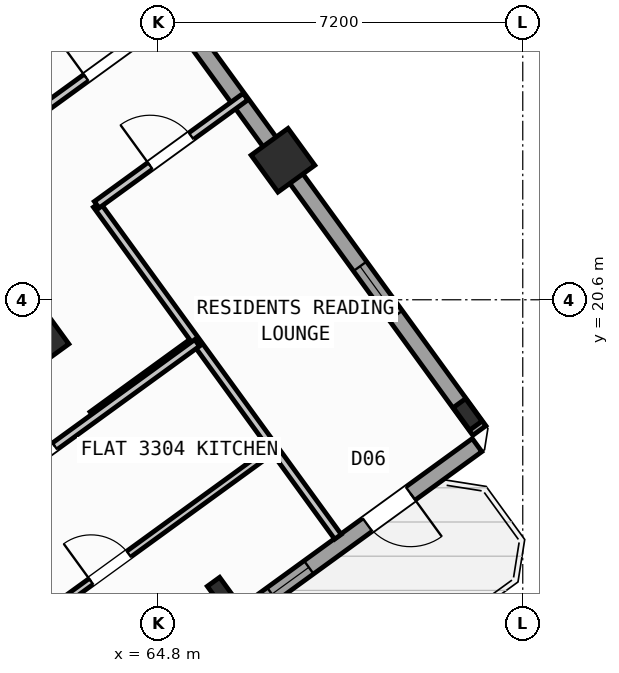
"""IFC4 building model, lengths in metres.
Left out: names, types, materials, properties, quantities, classifications, styles, units other than length and angle.
Written with IfcOpenShell. Run it as: python <this file> out.ifc"""

import sys

from ifc_helpers import new_model, si_unit, direction, frame, frame_2d, origin, origin_2d, place, context, subcontext, project, spatial, rectangle, hollow_rectangle, i_section, extrude, source, transform, mapped, element, fill, save


model = new_model("IFC4")
c1 = context("Model", 3, precision=1e-05, world=origin(), true_north=direction((0.0, 1.0)))
c2 = subcontext(c1, "Body", "Model", "MODEL_VIEW")
j1 = project(units=[si_unit("LENGTHUNIT", "METRE"), si_unit("PLANEANGLEUNIT", "RADIAN")], contexts=[c1])
p1 = place(None, origin())
s1 = spatial("IfcSite", under=j1, at=p1, CompositionType="ELEMENT")
p2 = place(p1, origin())
s2 = spatial("IfcBuilding", under=s1, at=p2, CompositionType="ELEMENT")
p3 = place(p2, frame((0.0, 0.0, 132.6)))
s3 = spatial("IfcBuildingStorey", under=s2, at=p3, CompositionType="ELEMENT", Elevation=132.6)
m1 = source(origin(), c2, "Body", "SweptSolid", [
    extrude(i_section(OverallWidth=0.3, OverallDepth=0.55, WebThickness=0.015, FlangeThickness=0.029, at=origin_2d()), origin(), (0.0, 0.0, 1.0), 3.6),
])
p4 = place(p3, frame((66.058, 14.811, 0.0), z_axis=(0.0, 0.0, 1.0), x_axis=(0.809016994375, 0.587785252292, 0.0)))
e1 = element("IfcColumn", 1, at=p4, inside=s3, PredefinedType="COLUMN", context=c2, shape_type="MappedRepresentation", body=[
    mapped(m1, transform((0.0, 0.0, 0.0), scale=1.0)),
])
m2 = source(origin(), c2, "Body", "SweptSolid", [
    extrude(hollow_rectangle(XDim=0.9, YDim=0.9, WallThickness=0.036, at=origin_2d()), origin(), (0.0, 0.0, 1.0), 3.6),
])
p5 = place(p3, frame((62.414, 19.827, 0.0), z_axis=(0.0, 0.0, 1.0), x_axis=(0.809016994375, 0.587785252292, 0.0)))
e2 = element("IfcColumn", 2, at=p5, inside=s3, PredefinedType="COLUMN", context=c2, shape_type="MappedRepresentation", body=[
    mapped(m2, transform((0.0, 0.0, 0.0), scale=1.0)),
])
p6 = place(p3, frame((70.912, 18.338, 0.0), z_axis=(0.0, 0.0, 1.0), x_axis=(0.809016994375, 0.587785252292, 0.0)))
e3 = element("IfcColumn", 3, at=p6, inside=s3, PredefinedType="COLUMN", context=c2, shape_type="MappedRepresentation", body=[
    mapped(m1, transform((0.0, 0.0, 0.0), scale=1.0)),
])
p7 = place(p3, frame((67.268, 23.354, 0.0), z_axis=(0.0, 0.0, 1.0), x_axis=(0.809016994375, 0.587785252292, 0.0)))
e4 = element("IfcColumn", 4, at=p7, inside=s3, PredefinedType="COLUMN", context=c2, shape_type="MappedRepresentation", body=[
    mapped(m2, transform((0.0, 0.0, 0.0), scale=1.0)),
])
p8 = place(p3, frame((58.455, 35.484, 0.0), z_axis=(0.0, 0.0, 1.0), x_axis=(0.587783625747, -0.809018176127, 0.0)))
e5 = element("IfcWall", 5, at=p8, inside=s3, PredefinedType="STANDARD", context=c2, shape_type="SweptSolid", body=[
    extrude(rectangle(XDim=21.587, YDim=0.32, at=frame_2d((10.794, 0.0))), origin(), (0.0, 0.0, 1.0), 2.745),
])
p9 = place(p8, frame((1.475, 0.0, 0.8)))
e6 = element("IfcOpeningElement", 6, at=p9, cuts=e5, PredefinedType="OPENING", context=c2, shape_type="SweptSolid", body=[
    extrude(rectangle(XDim=2.1, YDim=1.55, at=frame_2d((1.05, 0.775))), frame((0.0, 0.17, 0.0), z_axis=(0.0, -1.0, 0.0), x_axis=(1.0, 0.0, 0.0)), (0.0, 0.0, 1.0), 0.34),
])
p10 = place(p8, frame((5.13, 0.0, 0.85)))
e7 = element("IfcOpeningElement", 7, at=p10, cuts=e5, PredefinedType="OPENING", context=c2, shape_type="SweptSolid", body=[
    extrude(rectangle(XDim=1.5, YDim=1.5, at=frame_2d((0.75, 0.75))), frame((0.0, 0.17, 0.0), z_axis=(0.0, -1.0, 0.0), x_axis=(1.0, 0.0, 0.0)), (0.0, 0.0, 1.0), 0.34),
])
p11 = place(p8, frame((8.929, 0.0, 0.85)))
e8 = element("IfcOpeningElement", 8, at=p11, cuts=e5, PredefinedType="OPENING", context=c2, shape_type="SweptSolid", body=[
    extrude(rectangle(XDim=1.5, YDim=1.5, at=frame_2d((0.75, 0.75))), frame((0.0, 0.17, 0.0), z_axis=(0.0, -1.0, 0.0), x_axis=(1.0, 0.0, 0.0)), (0.0, 0.0, 1.0), 0.34),
])
p12 = place(p8, frame((17.581, 0.0, 0.95)))
e9 = element("IfcOpeningElement", 9, at=p12, cuts=e5, PredefinedType="OPENING", context=c2, shape_type="SweptSolid", body=[
    extrude(rectangle(XDim=1.2, YDim=1.4, at=frame_2d((0.6, 0.7))), frame((0.0, 0.17, 0.0), z_axis=(0.0, -1.0, 0.0), x_axis=(1.0, 0.0, 0.0)), (0.0, 0.0, 1.0), 0.34),
])
p13 = place(p3, frame((71.098, 17.731, 0.0), z_axis=(0.0, 0.0, 1.0), x_axis=(-0.809021120468, -0.587779573171, 0.0)))
e10 = element("IfcWall", 10, at=p13, inside=s3, PredefinedType="STANDARD", context=c2, shape_type="SweptSolid", body=[
    extrude(rectangle(XDim=17.588, YDim=0.32, at=frame_2d((8.794, 0.0))), origin(), (0.0, 0.0, 1.0), 3.32),
])
p14 = place(p13, frame((1.624, 0.0, 0.0)))
e11 = element("IfcOpeningElement", 11, at=p14, cuts=e10, PredefinedType="OPENING", context=c2, shape_type="SweptSolid", body=[
    extrude(rectangle(XDim=1.05, YDim=2.15, at=frame_2d((0.525, 1.075))), frame((0.0, 0.17, 0.0), z_axis=(0.0, -1.0, 0.0), x_axis=(1.0, 0.0, 0.0)), (0.0, 0.0, 1.0), 0.34),
])
p15 = place(p13, frame((4.104, 0.0, 1.0)))
e12 = element("IfcOpeningElement", 12, at=p15, cuts=e10, PredefinedType="OPENING", context=c2, shape_type="SweptSolid", body=[
    extrude(rectangle(XDim=0.9, YDim=1.25, at=frame_2d((0.45, 0.625))), frame((0.0, 0.17, 0.0), z_axis=(0.0, -1.0, 0.0), x_axis=(1.0, 0.0, 0.0)), (0.0, 0.0, 1.0), 0.34),
])
p16 = place(p13, frame((7.879, 0.0, 0.85)))
e13 = element("IfcOpeningElement", 13, at=p16, cuts=e10, PredefinedType="OPENING", context=c2, shape_type="SweptSolid", body=[
    extrude(rectangle(XDim=1.8, YDim=1.5, at=frame_2d((0.9, 0.75))), frame((0.0, 0.17, 0.0), z_axis=(0.0, -1.0, 0.0), x_axis=(1.0, 0.0, 0.0)), (0.0, 0.0, 1.0), 0.34),
])
p17 = place(p13, frame((12.849, 0.0, 0.85)))
e14 = element("IfcOpeningElement", 14, at=p17, cuts=e10, PredefinedType="OPENING", context=c2, shape_type="SweptSolid", body=[
    extrude(rectangle(XDim=1.8, YDim=1.5, at=frame_2d((0.9, 0.75))), frame((0.0, 0.17, 0.0), z_axis=(0.0, -1.0, 0.0), x_axis=(1.0, 0.0, 0.0)), (0.0, 0.0, 1.0), 0.34),
])
p18 = place(p3, frame((63.507, 18.322, 0.0), z_axis=(0.0, 0.0, 1.0), x_axis=(0.809034604122, 0.587761013791, 0.0)))
e15 = element("IfcWall", 15, at=p18, inside=s3, PredefinedType="PARTITIONING", context=c2, shape_type="SweptSolid", body=[
    extrude(rectangle(XDim=2.51, YDim=0.16, at=frame_2d((1.255, 0.0))), origin(), (0.0, 0.0, 1.0), 3.31),
])
p19 = place(p3, frame((68.353, 15.922, 0.0), z_axis=(0.0, 0.0, 1.0), x_axis=(-0.58776839458, 0.809029241952, 0.0)))
e16 = element("IfcWall", 16, at=p19, inside=s3, PredefinedType="PARTITIONING", context=c2, shape_type="SweptSolid", body=[
    extrude(rectangle(XDim=8.1, YDim=0.16, at=frame_2d((4.05, 0.0))), origin(), (0.0, 0.0, 1.0), 3.31),
])
p20 = place(p3, frame((63.592, 22.475, 0.0), z_axis=(0.0, 0.0, 1.0), x_axis=(0.809035546126, 0.58775971715, 0.0)))
e17 = element("IfcWall", 17, at=p20, inside=s3, PredefinedType="PARTITIONING", context=c2, shape_type="SweptSolid", body=[
    extrude(rectangle(XDim=3.63, YDim=0.16, at=frame_2d((1.815, 0.0))), origin(), (0.0, 0.0, 1.0), 3.31),
])
p21 = place(p20, frame((1.305, 0.0, 0.0)))
e18 = element("IfcOpeningElement", 18, at=p21, cuts=e17, PredefinedType="OPENING", context=c2, shape_type="SweptSolid", body=[
    extrude(rectangle(XDim=1.0, YDim=2.1, at=frame_2d((0.5, 1.05))), frame((0.0, 0.09, 0.0), z_axis=(0.0, -1.0, 0.0), x_axis=(1.0, 0.0, 0.0)), (0.0, 0.0, 1.0), 0.18),
])
p22 = place(p3, frame((62.328, 24.215, 0.0), z_axis=(0.0, 0.0, 1.0), x_axis=(0.809003564202, 0.587803736896, 0.0)))
e19 = element("IfcWall", 19, at=p22, inside=s3, PredefinedType="PARTITIONING", context=c2, shape_type="SweptSolid", body=[
    extrude(rectangle(XDim=3.63, YDim=0.16, at=frame_2d((1.815, 0.0))), origin(), (0.0, 0.0, 1.0), 3.31),
])
p23 = place(p22, frame((1.305, 0.0, 0.0)))
e20 = element("IfcOpeningElement", 20, at=p23, cuts=e19, PredefinedType="OPENING", context=c2, shape_type="SweptSolid", body=[
    extrude(rectangle(XDim=1.0, YDim=2.1, at=frame_2d((0.5, 1.05))), frame((0.0, 0.09, 0.0), z_axis=(0.0, -1.0, 0.0), x_axis=(1.0, 0.0, 0.0)), (0.0, 0.0, 1.0), 0.18),
])
p24 = place(p3, frame((53.705, 11.126, 0.0), z_axis=(0.0, 0.0, 1.0), x_axis=(0.809014504436, 0.587788679384, 0.0)))
e21 = element("IfcWall", 21, at=p24, inside=s3, PredefinedType="PARTITIONING", context=c2, shape_type="SweptSolid", body=[
    extrude(rectangle(XDim=14.67, YDim=0.16, at=frame_2d((7.335, 0.0))), origin(), (0.0, 0.0, 1.0), 3.31),
])
p25 = place(p24, frame((10.2, 0.0, 0.0)))
e22 = element("IfcOpeningElement", 22, at=p25, cuts=e21, PredefinedType="OPENING", context=c2, shape_type="SweptSolid", body=[
    extrude(rectangle(XDim=1.0, YDim=2.1, at=frame_2d((0.5, 1.05))), frame((0.0, 0.09, 0.0), z_axis=(0.0, -1.0, 0.0), x_axis=(1.0, 0.0, 0.0)), (0.0, 0.0, 1.0), 0.18),
])
p26 = place(p3, frame((56.249, 9.785, 0.0), z_axis=(0.0, 0.0, 1.0), x_axis=(0.809011747655, 0.587792473715, 0.0)))
e23 = element("IfcWall", 23, at=p26, inside=s3, PredefinedType="PLUMBINGWALL", context=c2, shape_type="SweptSolid", body=[
    extrude(rectangle(XDim=13.4, YDim=0.14, at=frame_2d((6.7, 0.0))), origin(), (0.0, 0.0, 1.0), 3.31),
])
p27 = place(p26, frame((8.94, 0.0, 0.0)))
e24 = element("IfcOpeningElement", 24, at=p27, cuts=e23, PredefinedType="OPENING", context=c2, shape_type="SweptSolid", body=[
    extrude(rectangle(XDim=0.92, YDim=2.08, at=frame_2d((0.46, 1.04))), frame((0.0, 0.08, 0.0), z_axis=(0.0, -1.0, 0.0), x_axis=(1.0, 0.0, 0.0)), (0.0, 0.0, 1.0), 0.16),
])
m3 = source(origin(), c2, "Body", "SweptSolid", [
    extrude(rectangle(XDim=1.05, YDim=2.15, at=frame_2d((0.525, 1.075))), frame((0.0, 0.025, 0.0), z_axis=(0.0, -1.0, 0.0), x_axis=(1.0, 0.0, 0.0)), (0.0, 0.0, 1.0), 0.05),
])
p28 = place(p14, origin())
e25 = element("IfcDoor", 25, at=p28, inside=s3, OperationType="SINGLE_SWING_LEFT", PredefinedType="DOOR", context=c2, shape_type="MappedRepresentation", body=[
    mapped(m3, transform((0.0, 0.0, 0.0), scale=1.0)),
])
fill(e11, e25)
m4 = source(origin(), c2, "Body", "SweptSolid", [
    extrude(rectangle(XDim=1.2, YDim=1.4, at=frame_2d((0.6, 0.7))), frame((0.0, 0.03, 0.0), z_axis=(0.0, -1.0, 0.0), x_axis=(1.0, 0.0, 0.0)), (0.0, 0.0, 1.0), 0.06),
])
p29 = place(p12, origin())
e26 = element("IfcWindow", 26, at=p29, inside=s3, PartitioningType="SINGLE_PANEL", PredefinedType="WINDOW", context=c2, shape_type="MappedRepresentation", body=[
    mapped(m4, transform((0.0, 0.0, 0.0), scale=1.0)),
])
fill(e9, e26)
m5 = source(origin(), c2, "Body", "SweptSolid", [
    extrude(rectangle(XDim=0.9, YDim=1.25, at=frame_2d((0.45, 0.625))), frame((0.0, 0.03, 0.0), z_axis=(0.0, -1.0, 0.0), x_axis=(1.0, 0.0, 0.0)), (0.0, 0.0, 1.0), 0.06),
])
p30 = place(p15, origin())
e27 = element("IfcWindow", 27, at=p30, inside=s3, PartitioningType="SINGLE_PANEL", PredefinedType="WINDOW", context=c2, shape_type="MappedRepresentation", body=[
    mapped(m5, transform((0.0, 0.0, 0.0), scale=1.0)),
])
fill(e12, e27)
m6 = source(origin(), c2, "Body", "SweptSolid", [
    extrude(rectangle(XDim=1.0, YDim=2.1, at=frame_2d((0.5, 1.05))), frame((0.0, 0.025, 0.0), z_axis=(0.0, -1.0, 0.0), x_axis=(1.0, 0.0, 0.0)), (0.0, 0.0, 1.0), 0.05),
])
p31 = place(p23, origin())
e28 = element("IfcDoor", 28, at=p31, inside=s3, OperationType="SINGLE_SWING_LEFT", PredefinedType="DOOR", context=c2, shape_type="MappedRepresentation", body=[
    mapped(m6, transform((0.0, 0.0, 0.0), scale=1.0)),
])
fill(e20, e28)
p32 = place(p21, origin())
e29 = element("IfcDoor", 29, at=p32, inside=s3, OperationType="SINGLE_SWING_LEFT", PredefinedType="DOOR", context=c2, shape_type="MappedRepresentation", body=[
    mapped(m6, transform((0.0, 0.0, 0.0), scale=1.0)),
])
fill(e18, e29)
p33 = place(p25, origin())
e30 = element("IfcDoor", 30, at=p33, inside=s3, OperationType="SINGLE_SWING_RIGHT", PredefinedType="DOOR", context=c2, shape_type="MappedRepresentation", body=[
    mapped(m6, transform((0.0, 0.0, 0.0), scale=1.0)),
])
fill(e22, e30)
m7 = source(origin(), c2, "Body", "SweptSolid", [
    extrude(rectangle(XDim=0.92, YDim=2.08, at=frame_2d((0.46, 1.04))), frame((0.0, 0.025, 0.0), z_axis=(0.0, -1.0, 0.0), x_axis=(1.0, 0.0, 0.0)), (0.0, 0.0, 1.0), 0.05),
])
p34 = place(p27, origin())
e31 = element("IfcDoor", 31, at=p34, inside=s3, OperationType="SINGLE_SWING_LEFT", PredefinedType="DOOR", context=c2, shape_type="MappedRepresentation", body=[
    mapped(m7, transform((0.0, 0.0, 0.0), scale=1.0)),
])
fill(e24, e31)
save(model, sys.argv[1])
